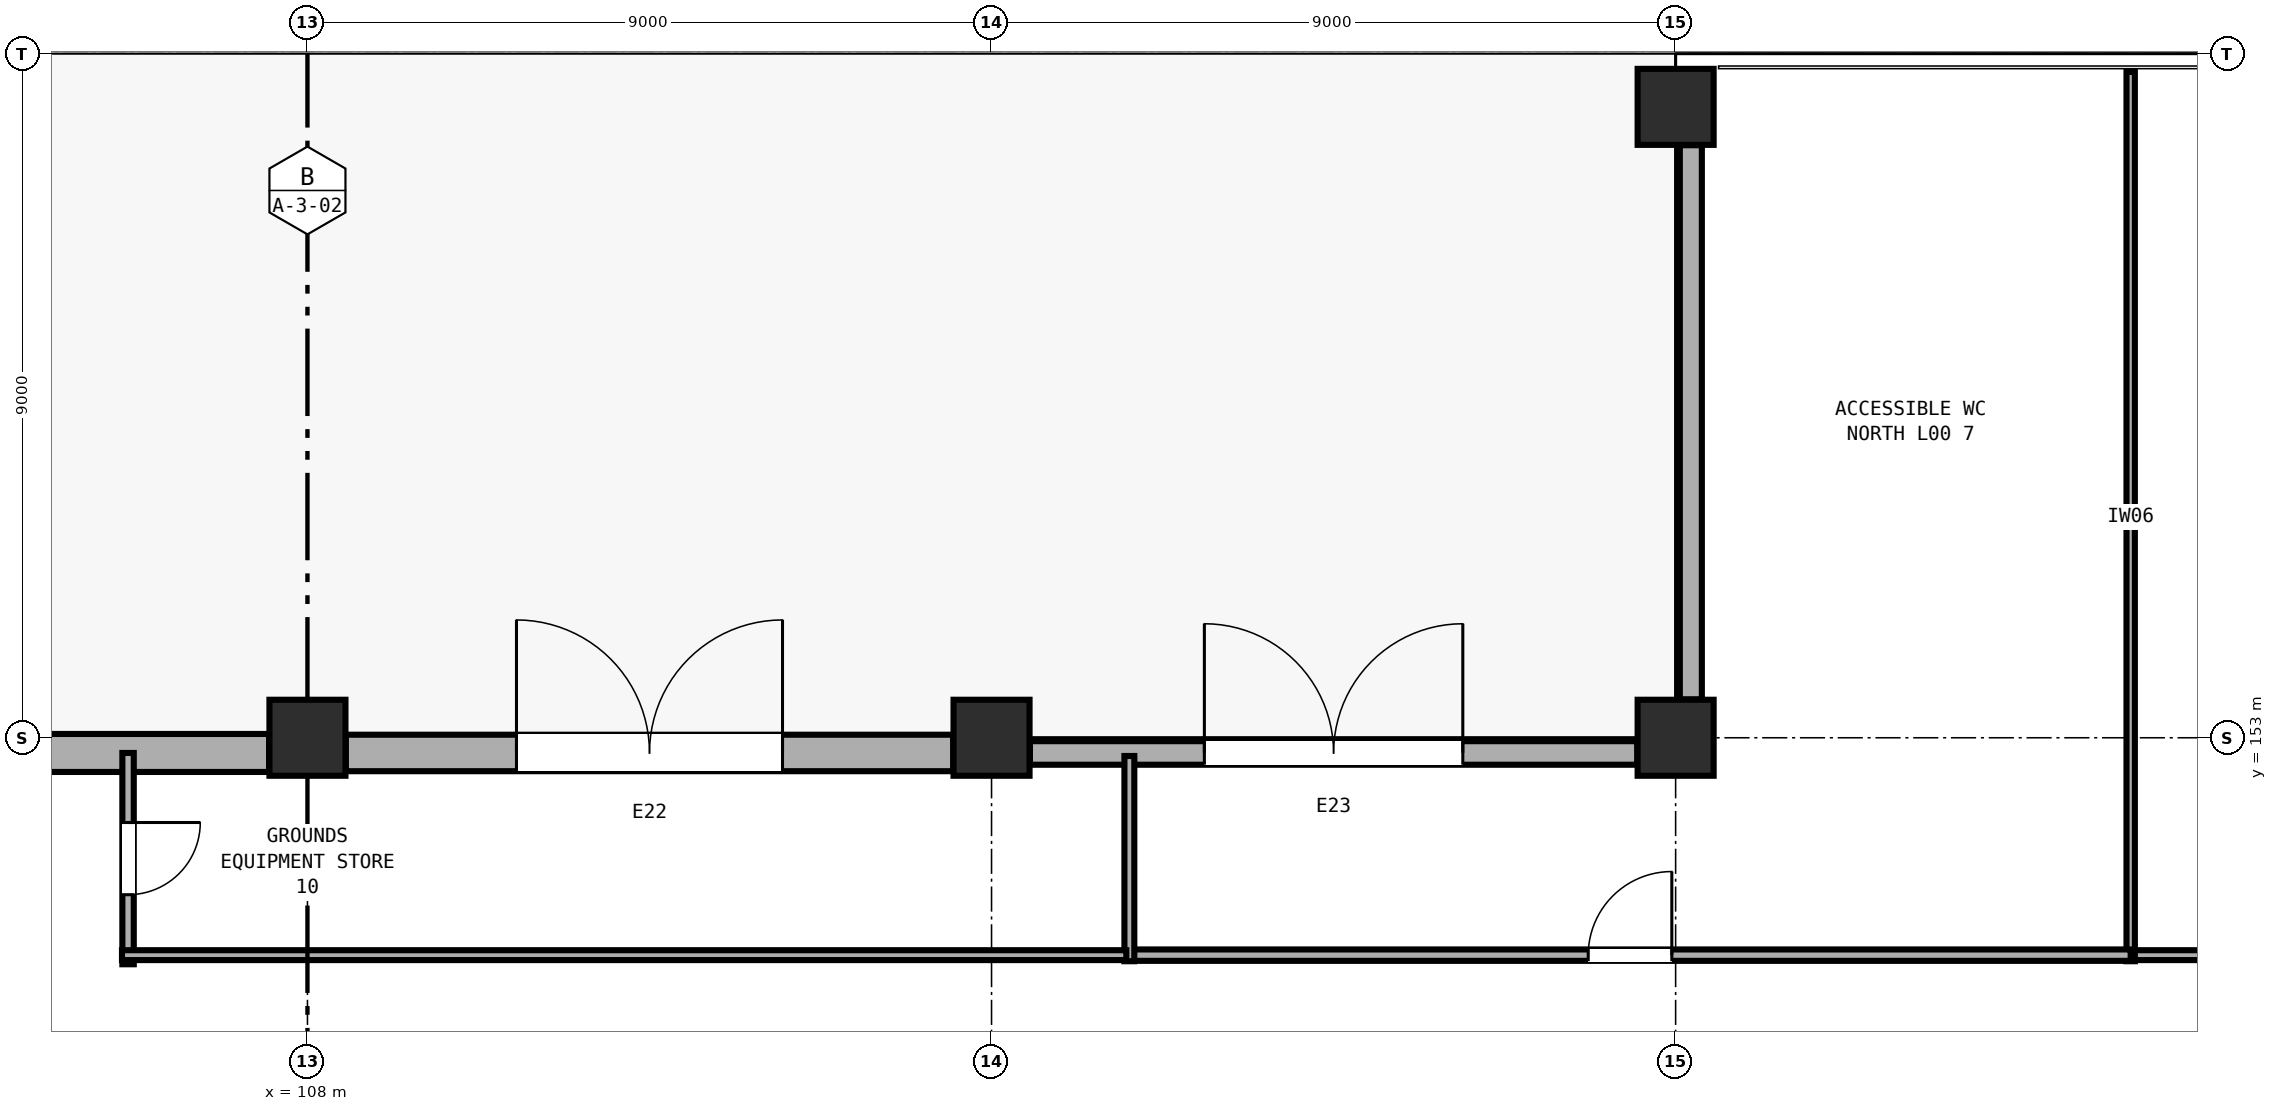
"""IFC4 building model, lengths in metres.
Left out: names, types, materials, properties, quantities, classifications, styles, units other than length and angle.
Written with IfcOpenShell. Run it as: python <this file> out.ifc"""

import sys

from ifc_helpers import new_model, si_unit, direction, frame, frame_2d, origin, origin_2d, place, context, subcontext, project, spatial, rectangle, extrude, element, fill, save


model = new_model("IFC4")
c1 = context("Model", 3, precision=1e-05, world=origin(), true_north=direction((0.0, 1.0)))
c2 = subcontext(c1, "Body", "Model", "MODEL_VIEW")
j1 = project(units=[si_unit("LENGTHUNIT", "METRE"), si_unit("PLANEANGLEUNIT", "RADIAN")], contexts=[c1])
p1 = place(None, origin())
s1 = spatial("IfcSite", under=j1, at=p1, CompositionType="ELEMENT")
p2 = place(p1, origin())
s2 = spatial("IfcBuilding", under=s1, at=p2, CompositionType="ELEMENT")
p3 = place(p2, origin())
s3 = spatial("IfcBuildingStorey", under=s2, at=p3, CompositionType="ELEMENT", Elevation=0.0)
for number, where, z_axis, x_axis in (
    (1, (108.0, 153.0, 0.0), (0.0, 0.0, 1.0), (1.0, 0.0, 0.0)),
    (2, (117.0, 153.0, 0.0), (0.0, 0.0, 1.0), (1.0, 0.0, 0.0)),
    (3, (126.0, 153.0, 0.0), (0.0, 0.0, 1.0), (1.0, 0.0, 0.0)),
    (4, (126.0, 161.3, 0.0), (0.0, 0.0, 1.0), (1.0, 0.0, 0.0)),
):
    element("IfcColumn", number, at=place(p3, frame(where, z_axis=z_axis, x_axis=x_axis)), inside=s3, PredefinedType="COLUMN", context=c2, shape_type="SweptSolid", body=[
        extrude(rectangle(XDim=1.0, YDim=1.0, at=origin_2d()), origin(), (0.0, 0.0, 1.0), 4.8),
    ])
p4 = place(p3, frame((99.505, 152.8, 0.0), z_axis=(0.0, 0.0, 1.0), x_axis=(1.0, 0.0, 0.0)))
e5 = element("IfcWall", 5, at=p4, inside=s3, PredefinedType="SOLIDWALL", context=c2, shape_type="SweptSolid", body=[
    extrude(rectangle(XDim=7.99, YDim=0.5, at=frame_2d((3.995, 0.0))), origin(), (0.0, 0.0, 1.0), 3.58),
])
p5 = place(p3, frame((108.505, 152.8, 0.0), z_axis=(0.0, 0.0, 1.0), x_axis=(1.0, 0.0, 0.0)))
e6 = element("IfcWall", 6, at=p5, inside=s3, PredefinedType="SOLIDWALL", context=c2, shape_type="SweptSolid", body=[
    extrude(rectangle(XDim=7.99, YDim=0.48, at=frame_2d((3.995, 0.0))), origin(), (0.0, 0.0, 1.0), 3.58),
])
p6 = place(p5, frame((2.245, 0.0, 0.0)))
e7 = element("IfcOpeningElement", 7, at=p6, cuts=e6, PredefinedType="OPENING", context=c2, shape_type="SweptSolid", body=[
    extrude(rectangle(XDim=3.5, YDim=2.6, at=frame_2d((1.75, 1.3))), frame((0.0, 0.25, 0.0), z_axis=(0.0, -1.0, 0.0), x_axis=(1.0, 0.0, 0.0)), (0.0, 0.0, 1.0), 0.5),
])
p7 = place(p3, frame((117.505, 152.8, 0.0), z_axis=(0.0, 0.0, 1.0), x_axis=(1.0, 0.0, 0.0)))
e8 = element("IfcWall", 8, at=p7, inside=s3, PredefinedType="SOLIDWALL", context=c2, shape_type="SweptSolid", body=[
    extrude(rectangle(XDim=7.99, YDim=0.31, at=frame_2d((3.995, 0.0))), origin(), (0.0, 0.0, 1.0), 3.58),
])
p8 = place(p7, frame((2.295, 0.0, 0.0)))
e9 = element("IfcOpeningElement", 9, at=p8, cuts=e8, PredefinedType="OPENING", context=c2, shape_type="SweptSolid", body=[
    extrude(rectangle(XDim=3.4, YDim=2.55, at=frame_2d((1.7, 1.275))), frame((0.0, 0.165, 0.0), z_axis=(0.0, -1.0, 0.0), x_axis=(1.0, 0.0, 0.0)), (0.0, 0.0, 1.0), 0.33),
])
p9 = place(p3, frame((126.2, 153.505, 0.0), z_axis=(0.0, 0.0, 1.0), x_axis=(0.0, 1.0, 0.0)))
e10 = element("IfcWall", 10, at=p9, inside=s3, PredefinedType="SOLIDWALL", context=c2, shape_type="SweptSolid", body=[
    extrude(rectangle(XDim=7.29, YDim=0.29, at=frame_2d((3.645, 0.0))), origin(), (0.0, 0.0, 1.0), 3.58),
])
p10 = place(p3, frame((126.505, 161.8, 0.0), z_axis=(0.0, 0.0, 1.0), x_axis=(1.0, 0.0, 0.0)))
e11 = element("IfcWall", 11, at=p10, inside=s3, PredefinedType="SOLIDWALL", context=c2, shape_type="SweptSolid", body=[
    extrude(rectangle(XDim=7.99, YDim=0.5, at=frame_2d((3.995, 0.0))), origin(), (0.0, 0.0, 1.0), 3.58),
])
p11 = place(p3, frame((145.24, 150.14, 0.0), z_axis=(0.0, 0.0, 1.0), x_axis=(-1.0, 0.0, 0.0)))
e12 = element("IfcWall", 12, at=p11, inside=s3, PredefinedType="PARTITIONING", context=c2, shape_type="SweptSolid", body=[
    extrude(rectangle(XDim=13.213, YDim=0.13, at=frame_2d((6.607, 0.0))), origin(), (0.0, 0.0, 1.0), 3.28),
])
p12 = place(p3, frame((131.987, 150.06, 0.0), z_axis=(0.0, 0.0, 1.0), x_axis=(0.0, 1.0, 0.0)))
e13 = element("IfcWall", 13, at=p12, inside=s3, PredefinedType="PARTITIONING", context=c2, shape_type="SweptSolid", body=[
    extrude(rectangle(XDim=11.7, YDim=0.11, at=frame_2d((5.85, 0.0))), origin(), (0.0, 0.0, 1.0), 3.28),
])
p13 = place(p3, frame((118.813, 150.14, 0.0), z_axis=(0.0, 0.0, 1.0), x_axis=(1.0, 0.0, 0.0)))
e14 = element("IfcWall", 14, at=p13, inside=s3, PredefinedType="PARTITIONING", context=c2, shape_type="SweptSolid", body=[
    extrude(rectangle(XDim=13.174, YDim=0.15, at=frame_2d((6.587, 0.0))), origin(), (0.0, 0.0, 1.0), 3.28),
])
p14 = place(p13, frame((6.037, 0.0, 0.0)))
e15 = element("IfcOpeningElement", 15, at=p14, cuts=e14, PredefinedType="OPENING", context=c2, shape_type="SweptSolid", body=[
    extrude(rectangle(XDim=1.1, YDim=2.1, at=frame_2d((0.55, 1.05))), frame((0.0, 0.085, 0.0), z_axis=(0.0, -1.0, 0.0), x_axis=(1.0, 0.0, 0.0)), (0.0, 0.0, 1.0), 0.17),
])
p15 = place(p3, frame((118.813, 150.06, 0.0), z_axis=(0.0, 0.0, 1.0), x_axis=(0.0, 1.0, 0.0)))
e16 = element("IfcWall", 16, at=p15, inside=s3, PredefinedType="PARTITIONING", context=c2, shape_type="SweptSolid", body=[
    extrude(rectangle(XDim=2.7, YDim=0.13, at=frame_2d((1.35, 0.0))), origin(), (0.0, 0.0, 1.0), 3.28),
])
p16 = place(p3, frame((105.64, 152.8, 0.0), z_axis=(0.0, 0.0, 1.0), x_axis=(0.0, -1.0, 0.0)))
e17 = element("IfcWall", 17, at=p16, inside=s3, PredefinedType="PARTITIONING", context=c2, shape_type="SweptSolid", body=[
    extrude(rectangle(XDim=2.78, YDim=0.15, at=frame_2d((1.39, 0.0))), origin(), (0.0, 0.0, 1.0), 3.28),
])
p17 = place(p16, frame((0.915, 0.0, 0.0)))
e18 = element("IfcOpeningElement", 18, at=p17, cuts=e17, PredefinedType="OPENING", context=c2, shape_type="SweptSolid", body=[
    extrude(rectangle(XDim=0.95, YDim=2.1, at=frame_2d((0.475, 1.05))), frame((0.0, 0.085, 0.0), z_axis=(0.0, -1.0, 0.0), x_axis=(1.0, 0.0, 0.0)), (0.0, 0.0, 1.0), 0.17),
])
p18 = place(p3, frame((118.773, 150.14, 0.0), z_axis=(0.0, 0.0, 1.0), x_axis=(-1.0, 0.0, 0.0)))
e19 = element("IfcWall", 19, at=p18, inside=s3, PredefinedType="PARTITIONING", context=c2, shape_type="SweptSolid", body=[
    extrude(rectangle(XDim=13.213, YDim=0.13, at=frame_2d((6.606, 0.0))), origin(), (0.0, 0.0, 1.0), 3.28),
])
p19 = place(p6, origin())
e20 = element("IfcDoor", 20, at=p19, inside=s3, OperationType="DOUBLE_DOOR_SINGLE_SWING", PredefinedType="DOOR", context=c2, shape_type="SweptSolid", body=[
    extrude(rectangle(XDim=3.5, YDim=2.6, at=frame_2d((1.75, 1.3))), frame((0.0, 0.025, 0.0), z_axis=(0.0, -1.0, 0.0), x_axis=(1.0, 0.0, 0.0)), (0.0, 0.0, 1.0), 0.05),
])
fill(e7, e20)
p20 = place(p8, origin())
e21 = element("IfcDoor", 21, at=p20, inside=s3, OperationType="DOUBLE_DOOR_SINGLE_SWING", PredefinedType="DOOR", context=c2, shape_type="SweptSolid", body=[
    extrude(rectangle(XDim=3.4, YDim=2.55, at=frame_2d((1.7, 1.275))), frame((0.0, 0.025, 0.0), z_axis=(0.0, -1.0, 0.0), x_axis=(1.0, 0.0, 0.0)), (0.0, 0.0, 1.0), 0.05),
])
fill(e9, e21)
p21 = place(p14, origin())
e22 = element("IfcDoor", 22, at=p21, inside=s3, OperationType="SINGLE_SWING_RIGHT", PredefinedType="DOOR", context=c2, shape_type="SweptSolid", body=[
    extrude(rectangle(XDim=1.1, YDim=2.1, at=frame_2d((0.55, 1.05))), frame((0.0, 0.025, 0.0), z_axis=(0.0, -1.0, 0.0), x_axis=(1.0, 0.0, 0.0)), (0.0, 0.0, 1.0), 0.05),
])
fill(e15, e22)
p22 = place(p17, origin())
e23 = element("IfcDoor", 23, at=p22, inside=s3, OperationType="SINGLE_SWING_LEFT", PredefinedType="DOOR", context=c2, shape_type="SweptSolid", body=[
    extrude(rectangle(XDim=0.95, YDim=2.1, at=frame_2d((0.475, 1.05))), frame((0.0, 0.025, 0.0), z_axis=(0.0, -1.0, 0.0), x_axis=(1.0, 0.0, 0.0)), (0.0, 0.0, 1.0), 0.05),
])
fill(e18, e23)
save(model, sys.argv[1])
